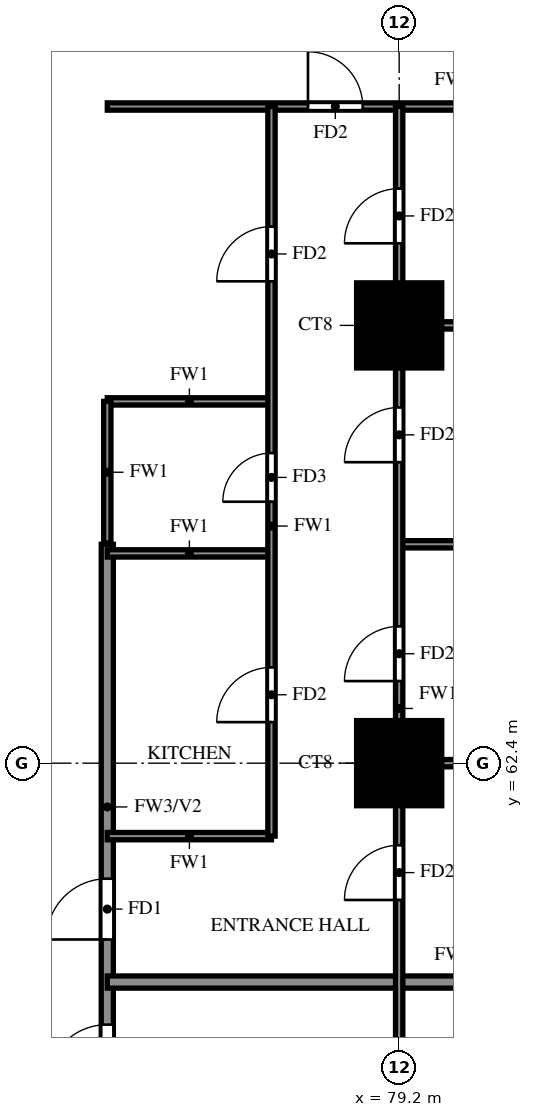
"""IFC4 building model, lengths in metres.
Left out: names, types, materials, properties, quantities, classifications, styles, units other than length and angle.
Written with IfcOpenShell. Run it as: python <this file> out.ifc"""

import sys

from ifc_helpers import new_model, si_unit, direction, frame, frame_2d, origin, origin_2d, place, context, subcontext, project, spatial, rectangle, extrude, source, transform, mapped, element, fill, save


model = new_model("IFC4")
c1 = context("Model", 3, precision=1e-05, world=origin(), true_north=direction((0.0, 1.0)))
c2 = subcontext(c1, "Body", "Model", "MODEL_VIEW")
j1 = project(units=[si_unit("LENGTHUNIT", "METRE"), si_unit("PLANEANGLEUNIT", "RADIAN")], contexts=[c1])
p1 = place(None, origin())
s1 = spatial("IfcSite", under=j1, at=p1, CompositionType="ELEMENT")
p2 = place(p1, origin())
s2 = spatial("IfcBuilding", under=s1, at=p2, CompositionType="ELEMENT")
p3 = place(p2, frame((0.0, 0.0, 37.5)))
s3 = spatial("IfcBuildingStorey", under=s2, at=p3, CompositionType="ELEMENT", Elevation=37.5)
m1 = source(origin(), c2, "Body", "SweptSolid", [
    extrude(rectangle(XDim=1.4, YDim=1.4, at=origin_2d()), origin(), (0.0, 0.0, 1.0), 3.18),
])
for number, where, z_axis, x_axis in (
    (1, (79.2, 62.4, 0.0), (0.0, 0.0, 1.0), (1.0, 0.0, 0.0)),
    (2, (79.2, 69.6, 0.0), (0.0, 0.0, 1.0), (1.0, 0.0, 0.0)),
):
    element("IfcColumn", number, at=place(p3, frame(where, z_axis=z_axis, x_axis=x_axis)), inside=s3, PredefinedType="COLUMN", context=c2, shape_type="MappedRepresentation", body=[
        mapped(m1, transform((0.0, 0.0, 0.0))),
    ])
p4 = place(p3, frame((74.4, 56.4, 0.0), z_axis=(0.0, 0.0, 1.0), x_axis=(0.0, 1.0, 0.0)))
e3 = element("IfcWall", 3, at=p4, inside=s3, PredefinedType="SOLIDWALL", context=c2, shape_type="SweptSolid", body=[
    extrude(rectangle(XDim=9.6, YDim=0.2, at=frame_2d((4.8, 0.0))), origin(), (0.0, 0.0, 1.0), 3.18),
])
p5 = place(p4, frame((0.7, 0.0, 0.0)))
e4 = element("IfcOpeningElement", 4, at=p5, cuts=e3, PredefinedType="OPENING", context=c2, shape_type="SweptSolid", body=[
    extrude(rectangle(XDim=1.0, YDim=2.1, at=frame_2d((0.5, 1.05))), frame((0.0, 0.11, 0.0), z_axis=(0.0, -1.0, 0.0), x_axis=(1.0, 0.0, 0.0)), (0.0, 0.0, 1.0), 0.22),
])
p6 = place(p4, frame((3.1, 0.0, 0.0)))
e5 = element("IfcOpeningElement", 5, at=p6, cuts=e3, PredefinedType="OPENING", context=c2, shape_type="SweptSolid", body=[
    extrude(rectangle(XDim=1.0, YDim=2.1, at=frame_2d((0.5, 1.05))), frame((0.0, 0.11, 0.0), z_axis=(0.0, -1.0, 0.0), x_axis=(1.0, 0.0, 0.0)), (0.0, 0.0, 1.0), 0.22),
])
p7 = place(p3, frame((74.4, 58.8, 0.0), z_axis=(0.0, 0.0, 1.0), x_axis=(1.0, 0.0, 0.0)))
e6 = element("IfcWall", 6, at=p7, inside=s3, PredefinedType="SOLIDWALL", context=c2, shape_type="SweptSolid", body=[
    extrude(rectangle(XDim=11.875, YDim=0.2, at=frame_2d((5.938, 0.0))), origin(), (0.0, 0.0, 1.0), 2.28),
])
p8 = place(p3, frame((74.4, 61.2, 0.0), z_axis=(0.0, 0.0, 1.0), x_axis=(1.0, 0.0, 0.0)))
e7 = element("IfcWall", 7, at=p8, inside=s3, PredefinedType="PARTITIONING", context=c2, shape_type="SweptSolid", body=[
    extrude(rectangle(XDim=2.7, YDim=0.12, at=frame_2d((1.35, 0.0))), origin(), (0.0, 0.0, 1.0), 3.18),
])
p9 = place(p3, frame((79.2, 62.4, 0.0), z_axis=(0.0, 0.0, 1.0), x_axis=(1.0, 0.0, 0.0)))
e8 = element("IfcWall", 8, at=p9, inside=s3, PredefinedType="PARTITIONING", context=c2, shape_type="SweptSolid", body=[
    extrude(rectangle(XDim=7.075, YDim=0.12, at=frame_2d((3.538, 0.0))), origin(), (0.0, 0.0, 1.0), 3.18),
])
p10 = place(p3, frame((74.4, 65.85, 0.0), z_axis=(0.0, 0.0, 1.0), x_axis=(1.0, 0.0, 0.0)))
e9 = element("IfcWall", 9, at=p10, inside=s3, PredefinedType="PARTITIONING", context=c2, shape_type="SweptSolid", body=[
    extrude(rectangle(XDim=2.7, YDim=0.12, at=frame_2d((1.35, 0.0))), origin(), (0.0, 0.0, 1.0), 3.18),
])
p11 = place(p3, frame((79.2, 66.0, 0.0), z_axis=(0.0, 0.0, 1.0), x_axis=(1.0, 0.0, 0.0)))
e10 = element("IfcWall", 10, at=p11, inside=s3, PredefinedType="PARTITIONING", context=c2, shape_type="SweptSolid", body=[
    extrude(rectangle(XDim=7.075, YDim=0.12, at=frame_2d((3.538, 0.0))), origin(), (0.0, 0.0, 1.0), 2.28),
])
p12 = place(p3, frame((74.4, 68.35, 0.0), z_axis=(0.0, 0.0, 1.0), x_axis=(1.0, 0.0, 0.0)))
e11 = element("IfcWall", 11, at=p12, inside=s3, PredefinedType="PARTITIONING", context=c2, shape_type="SweptSolid", body=[
    extrude(rectangle(XDim=2.7, YDim=0.12, at=frame_2d((1.35, 0.0))), origin(), (0.0, 0.0, 1.0), 3.18),
])
p13 = place(p3, frame((79.2, 69.6, 0.0), z_axis=(0.0, 0.0, 1.0), x_axis=(1.0, 0.0, 0.0)))
e12 = element("IfcWall", 12, at=p13, inside=s3, PredefinedType="PARTITIONING", context=c2, shape_type="SweptSolid", body=[
    extrude(rectangle(XDim=7.075, YDim=0.12, at=frame_2d((3.538, 0.0))), origin(), (0.0, 0.0, 1.0), 3.18),
])
p14 = place(p3, frame((74.4, 73.2, 0.0), z_axis=(0.0, 0.0, 1.0), x_axis=(1.0, 0.0, 0.0)))
e13 = element("IfcWall", 13, at=p14, inside=s3, PredefinedType="PARTITIONING", context=c2, shape_type="SweptSolid", body=[
    extrude(rectangle(XDim=11.875, YDim=0.12, at=frame_2d((5.938, 0.0))), origin(), (0.0, 0.0, 1.0), 2.28),
])
p15 = place(p14, frame((3.3, 0.0, 0.0)))
e14 = element("IfcOpeningElement", 14, at=p15, cuts=e13, PredefinedType="OPENING", context=c2, shape_type="SweptSolid", body=[
    extrude(rectangle(XDim=0.9, YDim=2.1, at=frame_2d((0.45, 1.05))), frame((0.0, 0.07, 0.0), z_axis=(0.0, -1.0, 0.0), x_axis=(1.0, 0.0, 0.0)), (0.0, 0.0, 1.0), 0.14),
])
p16 = place(p3, frame((74.4, 66.02, 0.0), z_axis=(0.0, 0.0, 1.0), x_axis=(0.0, 1.0, 0.0)))
e15 = element("IfcWall", 15, at=p16, inside=s3, PredefinedType="PARTITIONING", context=c2, shape_type="SweptSolid", body=[
    extrude(rectangle(XDim=2.33, YDim=0.12, at=frame_2d((1.165, 0.0))), origin(), (0.0, 0.0, 1.0), 3.18),
])
p17 = place(p3, frame((77.1, 61.2, 0.0), z_axis=(0.0, 0.0, 1.0), x_axis=(0.0, 1.0, 0.0)))
e16 = element("IfcWall", 16, at=p17, inside=s3, PredefinedType="PARTITIONING", context=c2, shape_type="SweptSolid", body=[
    extrude(rectangle(XDim=12.0, YDim=0.12, at=frame_2d((6.0, 0.0))), origin(), (0.0, 0.0, 1.0), 3.18),
])
p18 = place(p17, frame((1.875, 0.0, 0.0)))
e17 = element("IfcOpeningElement", 17, at=p18, cuts=e16, PredefinedType="OPENING", context=c2, shape_type="SweptSolid", body=[
    extrude(rectangle(XDim=0.9, YDim=2.1, at=frame_2d((0.45, 1.05))), frame((0.0, 0.07, 0.0), z_axis=(0.0, -1.0, 0.0), x_axis=(1.0, 0.0, 0.0)), (0.0, 0.0, 1.0), 0.14),
])
p19 = place(p17, frame((5.5, 0.0, 0.0)))
e18 = element("IfcOpeningElement", 18, at=p19, cuts=e16, PredefinedType="OPENING", context=c2, shape_type="SweptSolid", body=[
    extrude(rectangle(XDim=0.8, YDim=2.1, at=frame_2d((0.4, 1.05))), frame((0.0, 0.07, 0.0), z_axis=(0.0, -1.0, 0.0), x_axis=(1.0, 0.0, 0.0)), (0.0, 0.0, 1.0), 0.14),
])
p20 = place(p17, frame((9.125, 0.0, 0.0)))
e19 = element("IfcOpeningElement", 19, at=p20, cuts=e16, PredefinedType="OPENING", context=c2, shape_type="SweptSolid", body=[
    extrude(rectangle(XDim=0.9, YDim=2.1, at=frame_2d((0.45, 1.05))), frame((0.0, 0.07, 0.0), z_axis=(0.0, -1.0, 0.0), x_axis=(1.0, 0.0, 0.0)), (0.0, 0.0, 1.0), 0.14),
])
p21 = place(p3, frame((79.2, 55.2, 0.0), z_axis=(0.0, 0.0, 1.0), x_axis=(0.0, 1.0, 0.0)))
e20 = element("IfcWall", 20, at=p21, inside=s3, PredefinedType="PARTITIONING", context=c2, shape_type="SweptSolid", body=[
    extrude(rectangle(XDim=18.0, YDim=0.12, at=frame_2d((9.0, 0.0))), origin(), (0.0, 0.0, 1.0), 3.18),
])
p22 = place(p21, frame((1.05, 0.0, 0.0)))
e21 = element("IfcOpeningElement", 21, at=p22, cuts=e20, PredefinedType="OPENING", context=c2, shape_type="SweptSolid", body=[
    extrude(rectangle(XDim=1.5, YDim=2.1, at=frame_2d((0.75, 1.05))), frame((0.0, 0.07, 0.0), z_axis=(0.0, -1.0, 0.0), x_axis=(1.0, 0.0, 0.0)), (0.0, 0.0, 1.0), 0.14),
])
p23 = place(p21, frame((4.95, 0.0, 0.0)))
e22 = element("IfcOpeningElement", 22, at=p23, cuts=e20, PredefinedType="OPENING", context=c2, shape_type="SweptSolid", body=[
    extrude(rectangle(XDim=0.9, YDim=2.1, at=frame_2d((0.45, 1.05))), frame((0.0, 0.07, 0.0), z_axis=(0.0, -1.0, 0.0), x_axis=(1.0, 0.0, 0.0)), (0.0, 0.0, 1.0), 0.14),
])
p24 = place(p21, frame((8.55, 0.0, 0.0)))
e23 = element("IfcOpeningElement", 23, at=p24, cuts=e20, PredefinedType="OPENING", context=c2, shape_type="SweptSolid", body=[
    extrude(rectangle(XDim=0.9, YDim=2.1, at=frame_2d((0.45, 1.05))), frame((0.0, 0.07, 0.0), z_axis=(0.0, -1.0, 0.0), x_axis=(1.0, 0.0, 0.0)), (0.0, 0.0, 1.0), 0.14),
])
p25 = place(p21, frame((12.15, 0.0, 0.0)))
e24 = element("IfcOpeningElement", 24, at=p25, cuts=e20, PredefinedType="OPENING", context=c2, shape_type="SweptSolid", body=[
    extrude(rectangle(XDim=0.9, YDim=2.1, at=frame_2d((0.45, 1.05))), frame((0.0, 0.07, 0.0), z_axis=(0.0, -1.0, 0.0), x_axis=(1.0, 0.0, 0.0)), (0.0, 0.0, 1.0), 0.14),
])
p26 = place(p21, frame((15.75, 0.0, 0.0)))
e25 = element("IfcOpeningElement", 25, at=p26, cuts=e20, PredefinedType="OPENING", context=c2, shape_type="SweptSolid", body=[
    extrude(rectangle(XDim=0.9, YDim=2.1, at=frame_2d((0.45, 1.05))), frame((0.0, 0.07, 0.0), z_axis=(0.0, -1.0, 0.0), x_axis=(1.0, 0.0, 0.0)), (0.0, 0.0, 1.0), 0.14),
])
p27 = place(p5, origin())
e26 = element("IfcDoor", 26, at=p27, inside=s3, OperationType="SINGLE_SWING_LEFT", PredefinedType="DOOR", context=c2, shape_type="SweptSolid", body=[
    extrude(rectangle(XDim=1.0, YDim=2.1, at=frame_2d((0.5, 1.05))), frame((0.0, 0.025, 0.0), z_axis=(0.0, -1.0, 0.0), x_axis=(1.0, 0.0, 0.0)), (0.0, 0.0, 1.0), 0.05),
])
fill(e4, e26)
p28 = place(p6, origin())
e27 = element("IfcDoor", 27, at=p28, inside=s3, OperationType="SINGLE_SWING_RIGHT", PredefinedType="DOOR", context=c2, shape_type="SweptSolid", body=[
    extrude(rectangle(XDim=1.0, YDim=2.1, at=frame_2d((0.5, 1.05))), frame((0.0, 0.025, 0.0), z_axis=(0.0, -1.0, 0.0), x_axis=(1.0, 0.0, 0.0)), (0.0, 0.0, 1.0), 0.05),
])
fill(e5, e27)
p29 = place(p23, origin())
e28 = element("IfcDoor", 28, at=p29, inside=s3, OperationType="SINGLE_SWING_LEFT", PredefinedType="DOOR", context=c2, shape_type="SweptSolid", body=[
    extrude(rectangle(XDim=0.9, YDim=2.1, at=frame_2d((0.45, 1.05))), frame((0.0, 0.025, 0.0), z_axis=(0.0, -1.0, 0.0), x_axis=(1.0, 0.0, 0.0)), (0.0, 0.0, 1.0), 0.05),
])
fill(e22, e28)
p30 = place(p24, origin())
e29 = element("IfcDoor", 29, at=p30, inside=s3, OperationType="SINGLE_SWING_LEFT", PredefinedType="DOOR", context=c2, shape_type="SweptSolid", body=[
    extrude(rectangle(XDim=0.9, YDim=2.1, at=frame_2d((0.45, 1.05))), frame((0.0, 0.025, 0.0), z_axis=(0.0, -1.0, 0.0), x_axis=(1.0, 0.0, 0.0)), (0.0, 0.0, 1.0), 0.05),
])
fill(e23, e29)
p31 = place(p25, origin())
e30 = element("IfcDoor", 30, at=p31, inside=s3, OperationType="SINGLE_SWING_RIGHT", PredefinedType="DOOR", context=c2, shape_type="SweptSolid", body=[
    extrude(rectangle(XDim=0.9, YDim=2.1, at=frame_2d((0.45, 1.05))), frame((0.0, 0.025, 0.0), z_axis=(0.0, -1.0, 0.0), x_axis=(1.0, 0.0, 0.0)), (0.0, 0.0, 1.0), 0.05),
])
fill(e24, e30)
p32 = place(p26, origin())
e31 = element("IfcDoor", 31, at=p32, inside=s3, OperationType="SINGLE_SWING_LEFT", PredefinedType="DOOR", context=c2, shape_type="SweptSolid", body=[
    extrude(rectangle(XDim=0.9, YDim=2.1, at=frame_2d((0.45, 1.05))), frame((0.0, 0.025, 0.0), z_axis=(0.0, -1.0, 0.0), x_axis=(1.0, 0.0, 0.0)), (0.0, 0.0, 1.0), 0.05),
])
fill(e25, e31)
p33 = place(p15, origin())
e32 = element("IfcDoor", 32, at=p33, inside=s3, OperationType="SINGLE_SWING_LEFT", PredefinedType="DOOR", context=c2, shape_type="SweptSolid", body=[
    extrude(rectangle(XDim=0.9, YDim=2.1, at=frame_2d((0.45, 1.05))), frame((0.0, 0.025, 0.0), z_axis=(0.0, -1.0, 0.0), x_axis=(1.0, 0.0, 0.0)), (0.0, 0.0, 1.0), 0.05),
])
fill(e14, e32)
p34 = place(p18, origin())
e33 = element("IfcDoor", 33, at=p34, inside=s3, OperationType="SINGLE_SWING_RIGHT", PredefinedType="DOOR", context=c2, shape_type="SweptSolid", body=[
    extrude(rectangle(XDim=0.9, YDim=2.1, at=frame_2d((0.45, 1.05))), frame((0.0, 0.025, 0.0), z_axis=(0.0, -1.0, 0.0), x_axis=(1.0, 0.0, 0.0)), (0.0, 0.0, 1.0), 0.05),
])
fill(e17, e33)
p35 = place(p19, origin())
e34 = element("IfcDoor", 34, at=p35, inside=s3, OperationType="SINGLE_SWING_LEFT", PredefinedType="DOOR", context=c2, shape_type="SweptSolid", body=[
    extrude(rectangle(XDim=0.8, YDim=2.1, at=frame_2d((0.4, 1.05))), frame((0.0, 0.025, 0.0), z_axis=(0.0, -1.0, 0.0), x_axis=(1.0, 0.0, 0.0)), (0.0, 0.0, 1.0), 0.05),
])
fill(e18, e34)
p36 = place(p20, origin())
e35 = element("IfcDoor", 35, at=p36, inside=s3, OperationType="SINGLE_SWING_LEFT", PredefinedType="DOOR", context=c2, shape_type="SweptSolid", body=[
    extrude(rectangle(XDim=0.9, YDim=2.1, at=frame_2d((0.45, 1.05))), frame((0.0, 0.025, 0.0), z_axis=(0.0, -1.0, 0.0), x_axis=(1.0, 0.0, 0.0)), (0.0, 0.0, 1.0), 0.05),
])
fill(e19, e35)
save(model, sys.argv[1])
